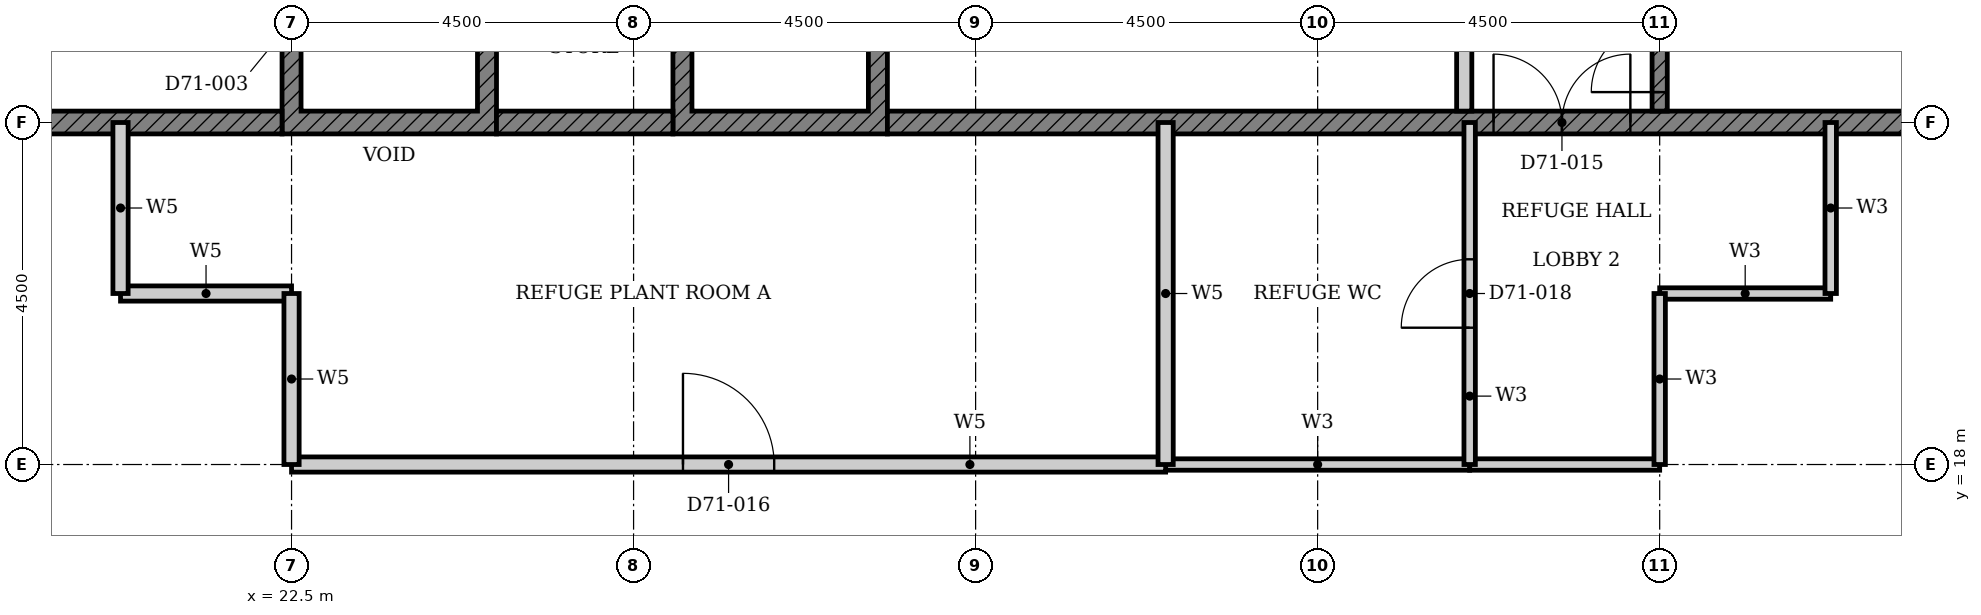
"""IFC4 building model, lengths in metres.
Left out: names, types, materials, properties, quantities, classifications, styles, units other than length and angle.
Written with IfcOpenShell. Run it as: python <this file> out.ifc"""

import sys

from ifc_helpers import new_model, si_unit, direction, frame, frame_2d, origin, place, context, subcontext, project, spatial, polyline, rectangle, outline, extrude, element, fill, save


model = new_model("IFC4")
c1 = context("Model", 3, precision=1e-05, world=origin(), true_north=direction((0.0, 1.0)))
c2 = subcontext(c1, "Body", "Model", "MODEL_VIEW")
j1 = project(units=[si_unit("LENGTHUNIT", "METRE"), si_unit("PLANEANGLEUNIT", "RADIAN")], contexts=[c1])
p1 = place(None, origin())
s1 = spatial("IfcSite", under=j1, at=p1, CompositionType="ELEMENT")
p2 = place(p1, origin())
s2 = spatial("IfcBuilding", under=s1, at=p2, CompositionType="ELEMENT")
p3 = place(p2, frame((0.0, 0.0, 278.6)))
s3 = spatial("IfcBuildingStorey", under=s2, at=p3, CompositionType="ELEMENT", Elevation=278.6)
p4 = place(p3, origin())
e1 = element("IfcWall", 1, at=p4, inside=s3, PredefinedType="SHEAR", context=c2, shape_type="SweptSolid", body=[
    extrude(outline(polyline([(22.375, 22.35), (25.197, 22.35), (25.197, 25.275), (24.947, 25.275), (24.947, 22.65), (22.625, 22.65), (22.625, 25.275), (22.375, 25.275), (22.375, 22.35)])), origin(), (0.0, 0.0, 1.0), 4.5),
])
p5 = place(p3, origin())
e2 = element("IfcWall", 2, at=p5, inside=s3, PredefinedType="SHEAR", context=c2, shape_type="SweptSolid", body=[
    extrude(outline(polyline([(27.518, 22.35), (30.339, 22.35), (30.339, 25.275), (30.089, 25.275), (30.089, 22.65), (27.768, 22.65), (27.768, 25.275), (27.518, 25.275), (27.518, 22.35)])), origin(), (0.0, 0.0, 1.0), 4.5),
])
p6 = place(p3, frame((18.15, 22.5, 0.0), z_axis=(0.0, 0.0, 1.0), x_axis=(1.0, 0.0, 0.0)))
e3 = element("IfcWall", 3, at=p6, inside=s3, PredefinedType="SHEAR", context=c2, shape_type="SweptSolid", body=[
    extrude(rectangle(XDim=4.225, YDim=0.3, at=frame_2d((2.113, 0.0))), origin(), (0.0, 0.0, 1.0), 4.5),
])
p7 = place(p3, frame((25.197, 22.5, 0.0), z_axis=(0.0, 0.0, 1.0), x_axis=(1.0, 0.0, 0.0)))
e4 = element("IfcWall", 4, at=p7, inside=s3, PredefinedType="SHEAR", context=c2, shape_type="SweptSolid", body=[
    extrude(rectangle(XDim=2.321, YDim=0.3, at=frame_2d((1.161, 0.0))), origin(), (0.0, 0.0, 1.0), 4.5),
])
p8 = place(p3, frame((30.339, 22.5, 0.0), z_axis=(0.0, 0.0, 1.0), x_axis=(1.0, 0.0, 0.0)))
e5 = element("IfcWall", 5, at=p8, inside=s3, PredefinedType="SHEAR", context=c2, shape_type="SweptSolid", body=[
    extrude(rectangle(XDim=14.511, YDim=0.3, at=frame_2d((7.255, 0.0))), origin(), (0.0, 0.0, 1.0), 4.5),
])
p9 = place(p8, frame((7.975, 0.0, 0.0)))
e6 = element("IfcOpeningElement", 6, at=p9, cuts=e5, PredefinedType="OPENING", context=c2, shape_type="SweptSolid", body=[
    extrude(rectangle(XDim=1.8, YDim=2.1, at=frame_2d((0.9, 1.05))), frame((0.0, 0.16, 0.0), z_axis=(0.0, -1.0, 0.0), x_axis=(1.0, 0.0, 0.0)), (0.0, 0.0, 1.0), 0.32),
])
p10 = place(p3, frame((37.928, 22.65, 0.0), z_axis=(0.0, 0.0, 1.0), x_axis=(0.0, 1.0, 0.0)))
e7 = element("IfcWall", 7, at=p10, inside=s3, PredefinedType="PARTITIONING", context=c2, shape_type="SweptSolid", body=[
    extrude(rectangle(XDim=2.625, YDim=0.2, at=frame_2d((1.312, 0.0))), origin(), (0.0, 0.0, 1.0), 4.5),
])
p11 = place(p3, frame((40.5, 22.65, 0.0), z_axis=(0.0, 0.0, 1.0), x_axis=(0.0, 1.0, 0.0)))
e8 = element("IfcWall", 8, at=p11, inside=s3, PredefinedType="SHEAR", context=c2, shape_type="SweptSolid", body=[
    extrude(rectangle(XDim=5.825, YDim=0.2, at=frame_2d((2.913, 0.0))), origin(), (0.0, 0.0, 1.0), 4.5),
])
p12 = place(p11, frame((0.25, 0.0, 0.0)))
e9 = element("IfcOpeningElement", 9, at=p12, cuts=e8, PredefinedType="OPENING", context=c2, shape_type="SweptSolid", body=[
    extrude(rectangle(XDim=1.8, YDim=2.1, at=frame_2d((0.9, 1.05))), frame((0.0, 0.11, 0.0), z_axis=(0.0, -1.0, 0.0), x_axis=(1.0, 0.0, 0.0)), (0.0, 0.0, 1.0), 0.22),
])
p13 = place(p3, frame((38.0, 18.0, 0.0), z_axis=(0.0, 0.0, 1.0), x_axis=(1.0, 0.0, 0.0)))
e10 = element("IfcWall", 10, at=p13, inside=s3, PredefinedType="PARTITIONING", context=c2, shape_type="SweptSolid", body=[
    extrude(rectangle(XDim=2.5, YDim=0.15, at=frame_2d((1.25, 0.0))), origin(), (0.0, 0.0, 1.0), 4.5),
])
p14 = place(p3, frame((34.0, 18.0, 0.0), z_axis=(0.0, 0.0, 1.0), x_axis=(1.0, 0.0, 0.0)))
e11 = element("IfcWall", 11, at=p14, inside=s3, PredefinedType="PARTITIONING", context=c2, shape_type="SweptSolid", body=[
    extrude(rectangle(XDim=4.0, YDim=0.15, at=frame_2d((2.0, 0.0))), origin(), (0.0, 0.0, 1.0), 4.5),
])
p15 = place(p3, frame((40.5, 20.25, 0.0), z_axis=(0.0, 0.0, 1.0), x_axis=(1.0, 0.0, 0.0)))
e12 = element("IfcWall", 12, at=p15, inside=s3, PredefinedType="PARTITIONING", context=c2, shape_type="SweptSolid", body=[
    extrude(rectangle(XDim=2.25, YDim=0.15, at=frame_2d((1.125, 0.0))), origin(), (0.0, 0.0, 1.0), 4.5),
])
p16 = place(p3, frame((38.0, 18.0, 0.0), z_axis=(0.0, 0.0, 1.0), x_axis=(0.0, 1.0, 0.0)))
e13 = element("IfcWall", 13, at=p16, inside=s3, PredefinedType="PARTITIONING", context=c2, shape_type="SweptSolid", body=[
    extrude(rectangle(XDim=4.5, YDim=0.15, at=frame_2d((2.25, 0.0))), origin(), (0.0, 0.0, 1.0), 4.5),
])
p17 = place(p16, frame((1.8, 0.0, 0.0)))
e14 = element("IfcOpeningElement", 14, at=p17, cuts=e13, PredefinedType="OPENING", context=c2, shape_type="SweptSolid", body=[
    extrude(rectangle(XDim=0.9, YDim=2.1, at=frame_2d((0.45, 1.05))), frame((0.0, 0.085, 0.0), z_axis=(0.0, -1.0, 0.0), x_axis=(1.0, 0.0, 0.0)), (0.0, 0.0, 1.0), 0.17),
])
for number, where, z_axis, x_axis in (
    (15, (40.5, 18.0, 0.0), (0.0, 0.0, 1.0), (0.0, 1.0, 0.0)),
    (16, (42.75, 20.25, 0.0), (0.0, 0.0, 1.0), (0.0, 1.0, 0.0)),
):
    element("IfcWall", number, at=place(p3, frame(where, z_axis=z_axis, x_axis=x_axis)), inside=s3, PredefinedType="PARTITIONING", context=c2, shape_type="SweptSolid", body=[
        extrude(rectangle(XDim=2.25, YDim=0.15, at=frame_2d((1.125, 0.0))), origin(), (0.0, 0.0, 1.0), 4.5),
    ])
p18 = place(p3, frame((22.5, 18.0, 0.0), z_axis=(0.0, 0.0, 1.0), x_axis=(1.0, 0.0, 0.0)))
e17 = element("IfcWall", 17, at=p18, inside=s3, PredefinedType="PARTITIONING", context=c2, shape_type="SweptSolid", body=[
    extrude(rectangle(XDim=11.5, YDim=0.2, at=frame_2d((5.75, 0.0))), origin(), (0.0, 0.0, 1.0), 4.5),
])
p19 = place(p18, frame((5.15, 0.0, 0.0)))
e18 = element("IfcOpeningElement", 18, at=p19, cuts=e17, PredefinedType="OPENING", context=c2, shape_type="SweptSolid", body=[
    extrude(rectangle(XDim=1.2, YDim=2.1, at=frame_2d((0.6, 1.05))), frame((0.0, 0.11, 0.0), z_axis=(0.0, -1.0, 0.0), x_axis=(1.0, 0.0, 0.0)), (0.0, 0.0, 1.0), 0.22),
])
for number, where, z_axis, x_axis in (
    (19, (20.25, 20.25, 0.0), (0.0, 0.0, 1.0), (1.0, 0.0, 0.0)),
    (20, (20.25, 20.25, 0.0), (0.0, 0.0, 1.0), (0.0, 1.0, 0.0)),
    (21, (22.5, 18.0, 0.0), (0.0, 0.0, 1.0), (0.0, 1.0, 0.0)),
):
    element("IfcWall", number, at=place(p3, frame(where, z_axis=z_axis, x_axis=x_axis)), inside=s3, PredefinedType="PARTITIONING", context=c2, shape_type="SweptSolid", body=[
        extrude(rectangle(XDim=2.25, YDim=0.2, at=frame_2d((1.125, 0.0))), origin(), (0.0, 0.0, 1.0), 4.5),
    ])
p20 = place(p3, frame((34.0, 18.0, 0.0), z_axis=(0.0, 0.0, 1.0), x_axis=(0.0, 1.0, 0.0)))
e22 = element("IfcWall", 22, at=p20, inside=s3, PredefinedType="PARTITIONING", context=c2, shape_type="SweptSolid", body=[
    extrude(rectangle(XDim=4.5, YDim=0.2, at=frame_2d((2.25, 0.0))), origin(), (0.0, 0.0, 1.0), 4.5),
])
p21 = place(p12, origin())
e23 = element("IfcDoor", 23, at=p21, inside=s3, OperationType="DOUBLE_DOOR_SINGLE_SWING", PredefinedType="DOOR", context=c2, shape_type="SweptSolid", body=[
    extrude(rectangle(XDim=1.8, YDim=2.1, at=frame_2d((0.9, 1.05))), frame((0.0, 0.025, 0.0), z_axis=(0.0, -1.0, 0.0), x_axis=(1.0, 0.0, 0.0)), (0.0, 0.0, 1.0), 0.05),
])
fill(e9, e23)
p22 = place(p9, origin())
e24 = element("IfcDoor", 24, at=p22, inside=s3, OperationType="DOUBLE_DOOR_SINGLE_SWING", PredefinedType="DOOR", context=c2, shape_type="SweptSolid", body=[
    extrude(rectangle(XDim=1.8, YDim=2.1, at=frame_2d((0.9, 1.05))), frame((0.0, 0.025, 0.0), z_axis=(0.0, -1.0, 0.0), x_axis=(1.0, 0.0, 0.0)), (0.0, 0.0, 1.0), 0.05),
])
fill(e6, e24)
p23 = place(p19, origin())
e25 = element("IfcDoor", 25, at=p23, inside=s3, OperationType="SINGLE_SWING_LEFT", PredefinedType="DOOR", context=c2, shape_type="SweptSolid", body=[
    extrude(rectangle(XDim=1.2, YDim=2.1, at=frame_2d((0.6, 1.05))), frame((0.0, 0.025, 0.0), z_axis=(0.0, -1.0, 0.0), x_axis=(1.0, 0.0, 0.0)), (0.0, 0.0, 1.0), 0.05),
])
fill(e18, e25)
p24 = place(p17, origin())
e26 = element("IfcDoor", 26, at=p24, inside=s3, OperationType="SINGLE_SWING_RIGHT", PredefinedType="DOOR", context=c2, shape_type="SweptSolid", body=[
    extrude(rectangle(XDim=0.9, YDim=2.1, at=frame_2d((0.45, 1.05))), frame((0.0, 0.025, 0.0), z_axis=(0.0, -1.0, 0.0), x_axis=(1.0, 0.0, 0.0)), (0.0, 0.0, 1.0), 0.05),
])
fill(e14, e26)
save(model, sys.argv[1])
